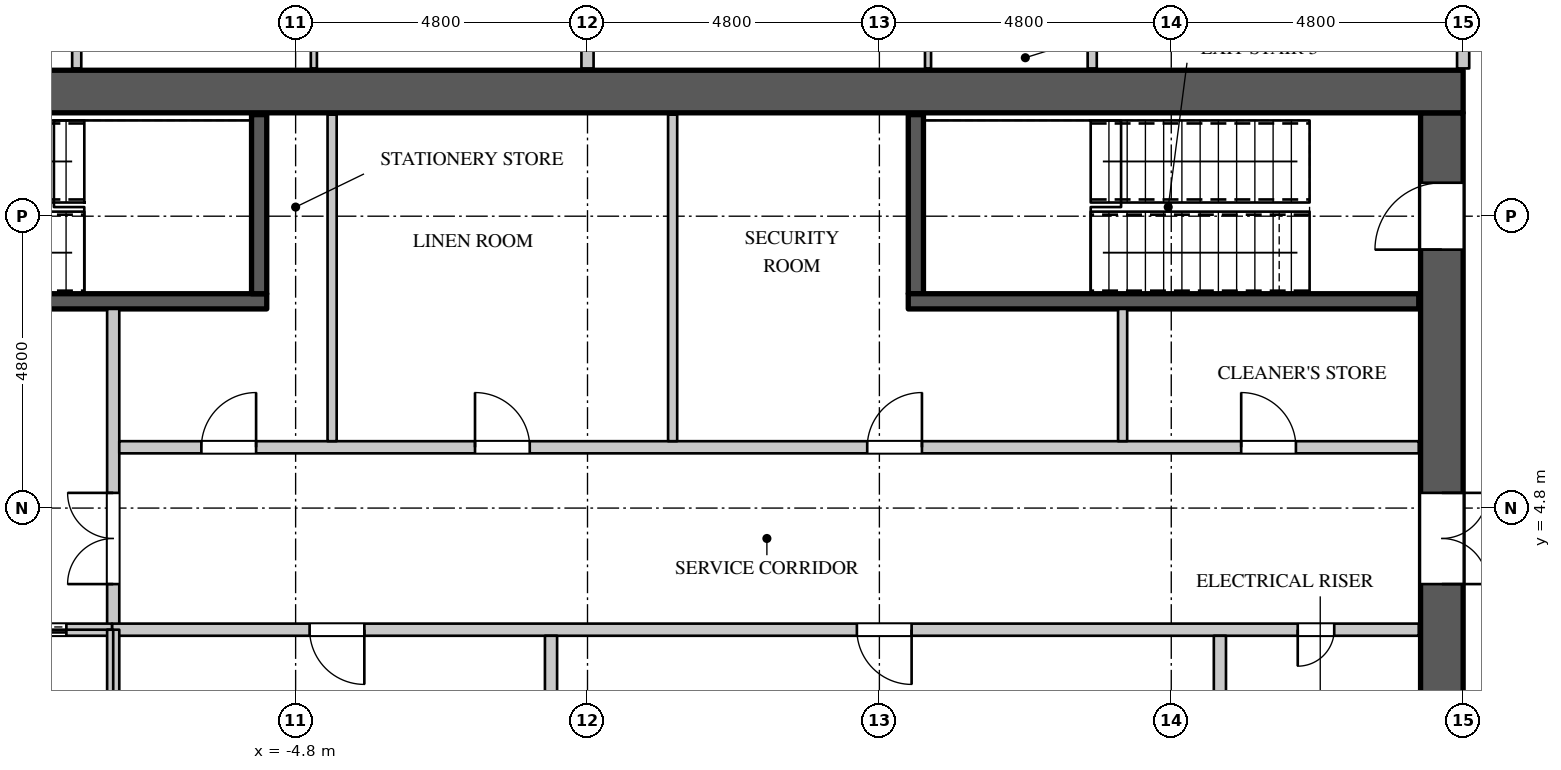
"""IFC4 building model, lengths in metres.
Left out: names, types, materials, properties, quantities, classifications, styles, units other than length and angle.
Written with IfcOpenShell. Run it as: python <this file> out.ifc"""

import sys

from ifc_helpers import new_model, si_unit, direction, frame, frame_2d, origin, place, context, subcontext, project, spatial, rectangle, extrude, element, fill, save


model = new_model("IFC4")
c1 = context("Model", 3, precision=1e-05, world=origin(), true_north=direction((0.0, 1.0)))
c2 = subcontext(c1, "Body", "Model", "MODEL_VIEW")
j1 = project(units=[si_unit("LENGTHUNIT", "METRE"), si_unit("PLANEANGLEUNIT", "RADIAN")], contexts=[c1])
p1 = place(None, origin())
s1 = spatial("IfcSite", under=j1, at=p1, CompositionType="ELEMENT")
p2 = place(p1, origin())
s2 = spatial("IfcBuilding", under=s1, at=p2, CompositionType="ELEMENT")
p3 = place(p2, frame((0.0, 0.0, 204.3)))
s3 = spatial("IfcBuildingStorey", under=s2, at=p3, CompositionType="ELEMENT", Elevation=204.3)
p4 = place(p3, frame((-14.4, 11.65, 0.0), z_axis=(0.0, 0.0, 1.0), x_axis=(1.0, 0.0, 0.0)))
e1 = element("IfcWall", 1, at=p4, inside=s3, PredefinedType="SHEAR", context=c2, shape_type="SweptSolid", body=[
    extrude(rectangle(XDim=28.8, YDim=0.7, at=frame_2d((14.4, 0.0))), origin(), (0.0, 0.0, 1.0), 4.2),
])
p5 = place(p3, frame((14.05, -11.3, 0.0), z_axis=(0.0, 0.0, 1.0), x_axis=(0.0, 1.0, 0.0)))
e2 = element("IfcWall", 2, at=p5, inside=s3, PredefinedType="SHEAR", context=c2, shape_type="SweptSolid", body=[
    extrude(rectangle(XDim=22.6, YDim=0.7, at=frame_2d((11.3, 0.0))), origin(), (0.0, 0.0, 1.0), 4.2),
])
p6 = place(p5, frame((20.35, 0.0, 0.0)))
e3 = element("IfcOpeningElement", 3, at=p6, cuts=e2, PredefinedType="OPENING", context=c2, shape_type="SweptSolid", body=[
    extrude(rectangle(XDim=1.1, YDim=2.2, at=frame_2d((0.55, 1.1))), frame((0.0, 0.36, 0.0), z_axis=(0.0, -1.0, 0.0), x_axis=(1.0, 0.0, 0.0)), (0.0, 0.0, 1.0), 0.72),
])
p7 = place(p5, frame((1.15, 0.0, 0.0)))
e4 = element("IfcOpeningElement", 4, at=p7, cuts=e2, PredefinedType="OPENING", context=c2, shape_type="SweptSolid", body=[
    extrude(rectangle(XDim=1.1, YDim=2.2, at=frame_2d((0.55, 1.1))), frame((0.0, 0.36, 0.0), z_axis=(0.0, -1.0, 0.0), x_axis=(1.0, 0.0, 0.0)), (0.0, 0.0, 1.0), 0.72),
])
p8 = place(p5, frame((14.85, 0.0, 0.0)))
e5 = element("IfcOpeningElement", 5, at=p8, cuts=e2, PredefinedType="OPENING", context=c2, shape_type="SweptSolid", body=[
    extrude(rectangle(XDim=1.5, YDim=2.4, at=frame_2d((0.75, 1.2))), frame((0.0, 0.36, 0.0), z_axis=(0.0, -1.0, 0.0), x_axis=(1.0, 0.0, 0.0)), (0.0, 0.0, 1.0), 0.72),
])
p9 = place(p5, frame((6.25, 0.0, 0.0)))
e6 = element("IfcOpeningElement", 6, at=p9, cuts=e2, PredefinedType="OPENING", context=c2, shape_type="SweptSolid", body=[
    extrude(rectangle(XDim=1.5, YDim=2.4, at=frame_2d((0.75, 1.2))), frame((0.0, 0.36, 0.0), z_axis=(0.0, -1.0, 0.0), x_axis=(1.0, 0.0, 0.0)), (0.0, 0.0, 1.0), 0.72),
])
p10 = place(p3, frame((-7.8, 2.8, 0.0), z_axis=(0.0, 0.0, 1.0), x_axis=(0.0, 1.0, 0.0)))
e7 = element("IfcWall", 7, at=p10, inside=s3, PredefinedType="PARTITIONING", context=c2, shape_type="SweptSolid", body=[
    extrude(rectangle(XDim=5.275, YDim=0.2, at=frame_2d((2.637, 0.0))), origin(), (0.0, 0.0, 1.0), 3.798),
])
p11 = place(p10, frame((0.75, 0.0, 0.0)))
e8 = element("IfcOpeningElement", 8, at=p11, cuts=e7, PredefinedType="OPENING", context=c2, shape_type="SweptSolid", body=[
    extrude(rectangle(XDim=1.5, YDim=2.4, at=frame_2d((0.75, 1.2))), frame((0.0, 0.11, 0.0), z_axis=(0.0, -1.0, 0.0), x_axis=(1.0, 0.0, 0.0)), (0.0, 0.0, 1.0), 0.22),
])
p12 = place(p3, frame((-7.7, 5.8, 0.0), z_axis=(0.0, 0.0, 1.0), x_axis=(1.0, 0.0, 0.0)))
e9 = element("IfcWall", 9, at=p12, inside=s3, PredefinedType="PARTITIONING", context=c2, shape_type="SweptSolid", body=[
    extrude(rectangle(XDim=21.37, YDim=0.2, at=frame_2d((10.685, 0.0))), origin(), (0.0, 0.0, 1.0), 3.798),
])
p13 = place(p12, frame((1.35, 0.0, 0.0)))
e10 = element("IfcOpeningElement", 10, at=p13, cuts=e9, PredefinedType="OPENING", context=c2, shape_type="SweptSolid", body=[
    extrude(rectangle(XDim=0.9, YDim=2.2, at=frame_2d((0.45, 1.1))), frame((0.0, 0.11, 0.0), z_axis=(0.0, -1.0, 0.0), x_axis=(1.0, 0.0, 0.0)), (0.0, 0.0, 1.0), 0.22),
])
p14 = place(p12, frame((5.85, 0.0, 0.0)))
e11 = element("IfcOpeningElement", 11, at=p14, cuts=e9, PredefinedType="OPENING", context=c2, shape_type="SweptSolid", body=[
    extrude(rectangle(XDim=0.9, YDim=2.2, at=frame_2d((0.45, 1.1))), frame((0.0, 0.11, 0.0), z_axis=(0.0, -1.0, 0.0), x_axis=(1.0, 0.0, 0.0)), (0.0, 0.0, 1.0), 0.22),
])
p15 = place(p12, frame((12.3, 0.0, 0.0)))
e12 = element("IfcOpeningElement", 12, at=p15, cuts=e9, PredefinedType="OPENING", context=c2, shape_type="SweptSolid", body=[
    extrude(rectangle(XDim=0.9, YDim=2.2, at=frame_2d((0.45, 1.1))), frame((0.0, 0.11, 0.0), z_axis=(0.0, -1.0, 0.0), x_axis=(1.0, 0.0, 0.0)), (0.0, 0.0, 1.0), 0.22),
])
p16 = place(p12, frame((18.45, 0.0, 0.0)))
e13 = element("IfcOpeningElement", 13, at=p16, cuts=e9, PredefinedType="OPENING", context=c2, shape_type="SweptSolid", body=[
    extrude(rectangle(XDim=0.9, YDim=2.2, at=frame_2d((0.45, 1.1))), frame((0.0, 0.11, 0.0), z_axis=(0.0, -1.0, 0.0), x_axis=(1.0, 0.0, 0.0)), (0.0, 0.0, 1.0), 0.22),
])
p17 = place(p3, frame((14.4, 12.03, 0.0), z_axis=(0.0, 0.0, 1.0), x_axis=(0.0, 1.0, 0.0)))
e14 = element("IfcWall", 14, at=p17, inside=s3, PredefinedType="PARTITIONING", context=c2, shape_type="SweptSolid", body=[
    extrude(rectangle(XDim=2.27, YDim=0.2, at=frame_2d((1.135, 0.0))), origin(), (0.0, 0.0, 1.0), 3.798),
])
p18 = place(p17, frame((0.55, 0.0, 0.0)))
e15 = element("IfcOpeningElement", 15, at=p18, cuts=e14, PredefinedType="OPENING", context=c2, shape_type="SweptSolid", body=[
    extrude(rectangle(XDim=1.1, YDim=2.4, at=frame_2d((0.55, 1.2))), frame((0.0, 0.11, 0.0), z_axis=(0.0, -1.0, 0.0), x_axis=(1.0, 0.0, 0.0)), (0.0, 0.0, 1.0), 0.22),
])
p19 = place(p3, frame((-8.4, 12.03, 0.0), z_axis=(0.0, 0.0, 1.0), x_axis=(0.0, 1.0, 0.0)))
e16 = element("IfcWall", 16, at=p19, inside=s3, PredefinedType="PARTITIONING", context=c2, shape_type="SweptSolid", body=[
    extrude(rectangle(XDim=4.245, YDim=0.15, at=frame_2d((2.123, 0.0))), origin(), (0.0, 0.0, 1.0), 3.798),
])
for number, where, z_axis, x_axis in (
    (17, (-4.2, 5.9, 0.0), (0.0, 0.0, 1.0), (0.0, 1.0, 0.0)),
    (18, (1.4, 5.9, 0.0), (0.0, 0.0, 1.0), (0.0, 1.0, 0.0)),
):
    element("IfcWall", number, at=place(p3, frame(where, z_axis=z_axis, x_axis=x_axis)), inside=s3, PredefinedType="PARTITIONING", context=c2, shape_type="SweptSolid", body=[
        extrude(rectangle(XDim=5.37, YDim=0.15, at=frame_2d((2.685, 0.0))), origin(), (0.0, 0.0, 1.0), 3.798),
    ])
p20 = place(p3, frame((8.3, 12.03, 0.0), z_axis=(0.0, 0.0, 1.0), x_axis=(0.0, 1.0, 0.0)))
e19 = element("IfcWall", 19, at=p20, inside=s3, PredefinedType="PARTITIONING", context=c2, shape_type="SweptSolid", body=[
    extrude(rectangle(XDim=3.445, YDim=0.15, at=frame_2d((1.723, 0.0))), origin(), (0.0, 0.0, 1.0), 3.798),
])
p21 = place(p20, frame((1.2, 0.0, 0.0)))
e20 = element("IfcOpeningElement", 20, at=p21, cuts=e19, PredefinedType="OPENING", context=c2, shape_type="SweptSolid", body=[
    extrude(rectangle(XDim=0.95, YDim=2.2, at=frame_2d((0.475, 1.1))), frame((0.0, 0.085, 0.0), z_axis=(0.0, -1.0, 0.0), x_axis=(1.0, 0.0, 0.0)), (0.0, 0.0, 1.0), 0.17),
])
p22 = place(p3, frame((8.8, 5.9, 0.0), z_axis=(0.0, 0.0, 1.0), x_axis=(0.0, 1.0, 0.0)))
e21 = element("IfcWall", 21, at=p22, inside=s3, PredefinedType="PARTITIONING", context=c2, shape_type="SweptSolid", body=[
    extrude(rectangle(XDim=2.175, YDim=0.15, at=frame_2d((1.087, 0.0))), origin(), (0.0, 0.0, 1.0), 3.798),
])
p23 = place(p3, frame((0.0, 12.03, 0.0), z_axis=(0.0, 0.0, 1.0), x_axis=(0.0, 1.0, 0.0)))
e22 = element("IfcWall", 22, at=p23, inside=s3, PredefinedType="PARTITIONING", context=c2, shape_type="SweptSolid", body=[
    extrude(rectangle(XDim=11.995, YDim=0.2, at=frame_2d((5.998, 0.0))), origin(), (0.0, 0.0, 1.0), 3.798),
])
p24 = place(p3, frame((-7.82, 2.8, 0.0), z_axis=(0.0, 0.0, 1.0), x_axis=(1.0, 0.0, 0.0)))
e23 = element("IfcWall", 23, at=p24, inside=s3, PredefinedType="PARTITIONING", context=c2, shape_type="SweptSolid", body=[
    extrude(rectangle(XDim=21.49, YDim=0.2, at=frame_2d((10.745, 0.0))), origin(), (0.0, 0.0, 1.0), 3.798),
])
p25 = place(p24, frame((19.5, 0.0, 0.0)))
e24 = element("IfcOpeningElement", 24, at=p25, cuts=e23, PredefinedType="OPENING", context=c2, shape_type="SweptSolid", body=[
    extrude(rectangle(XDim=0.6, YDim=2.0, at=frame_2d((0.3, 1.0))), frame((0.0, 0.11, 0.0), z_axis=(0.0, -1.0, 0.0), x_axis=(1.0, 0.0, 0.0)), (0.0, 0.0, 1.0), 0.22),
])
p26 = place(p24, frame((3.25, 0.0, 0.0)))
e25 = element("IfcOpeningElement", 25, at=p26, cuts=e23, PredefinedType="OPENING", context=c2, shape_type="SweptSolid", body=[
    extrude(rectangle(XDim=0.9, YDim=2.2, at=frame_2d((0.45, 1.1))), frame((0.0, 0.11, 0.0), z_axis=(0.0, -1.0, 0.0), x_axis=(1.0, 0.0, 0.0)), (0.0, 0.0, 1.0), 0.22),
])
p27 = place(p24, frame((12.25, 0.0, 0.0)))
e26 = element("IfcOpeningElement", 26, at=p27, cuts=e23, PredefinedType="OPENING", context=c2, shape_type="SweptSolid", body=[
    extrude(rectangle(XDim=0.9, YDim=2.2, at=frame_2d((0.45, 1.1))), frame((0.0, 0.11, 0.0), z_axis=(0.0, -1.0, 0.0), x_axis=(1.0, 0.0, 0.0)), (0.0, 0.0, 1.0), 0.22),
])
for number, where, z_axis, x_axis in (
    (27, (-0.6, 0.1, 0.0), (0.0, 0.0, 1.0), (0.0, 1.0, 0.0)),
    (28, (10.4, 0.1, 0.0), (0.0, 0.0, 1.0), (0.0, 1.0, 0.0)),
):
    element("IfcWall", number, at=place(p3, frame(where, z_axis=z_axis, x_axis=x_axis)), inside=s3, PredefinedType="PARTITIONING", context=c2, shape_type="SweptSolid", body=[
        extrude(rectangle(XDim=2.6, YDim=0.2, at=frame_2d((1.3, 0.0))), origin(), (0.0, 0.0, 1.0), 3.798),
    ])
p28 = place(p3, frame((-13.67, 2.8, 0.0), z_axis=(0.0, 0.0, 1.0), x_axis=(1.0, 0.0, 0.0)))
e29 = element("IfcWall", 29, at=p28, inside=s3, PredefinedType="PARTITIONING", context=c2, shape_type="SweptSolid", body=[
    extrude(rectangle(XDim=5.85, YDim=0.2, at=frame_2d((2.925, 0.0))), origin(), (0.0, 0.0, 1.0), 3.798),
])
p29 = place(p28, frame((1.05, 0.0, 0.0)))
e30 = element("IfcOpeningElement", 30, at=p29, cuts=e29, PredefinedType="OPENING", context=c2, shape_type="SweptSolid", body=[
    extrude(rectangle(XDim=1.1, YDim=2.2, at=frame_2d((0.55, 1.1))), frame((0.0, 0.11, 0.0), z_axis=(0.0, -1.0, 0.0), x_axis=(1.0, 0.0, 0.0)), (0.0, 0.0, 1.0), 0.22),
])
p30 = place(p28, frame((4.0, 0.0, 0.0)))
e31 = element("IfcOpeningElement", 31, at=p30, cuts=e29, PredefinedType="OPENING", context=c2, shape_type="SweptSolid", body=[
    extrude(rectangle(XDim=1.1, YDim=2.2, at=frame_2d((0.55, 1.1))), frame((0.0, 0.11, 0.0), z_axis=(0.0, -1.0, 0.0), x_axis=(1.0, 0.0, 0.0)), (0.0, 0.0, 1.0), 0.22),
])
p31 = place(p3, frame((-7.8, 0.0, 0.0), z_axis=(0.0, 0.0, 1.0), x_axis=(0.0, 1.0, 0.0)))
e32 = element("IfcWall", 32, at=p31, inside=s3, PredefinedType="PARTITIONING", context=c2, shape_type="SweptSolid", body=[
    extrude(rectangle(XDim=2.8, YDim=0.2, at=frame_2d((1.4, 0.0))), origin(), (0.0, 0.0, 1.0), 3.798),
])
p32 = place(p3, frame((-13.67, 8.2, 0.0), z_axis=(0.0, 0.0, 1.0), x_axis=(1.0, 0.0, 0.0)))
e33 = element("IfcWall", 33, at=p32, inside=s3, PredefinedType="SHEAR", context=c2, shape_type="SweptSolid", body=[
    extrude(rectangle(XDim=8.395, YDim=0.25, at=frame_2d((4.198, 0.0))), origin(), (0.0, 0.0, 1.0), 3.798),
])
p33 = place(p32, frame((0.15, 0.0, 0.0)))
e34 = element("IfcOpeningElement", 34, at=p33, cuts=e33, PredefinedType="OPENING", context=c2, shape_type="SweptSolid", body=[
    extrude(rectangle(XDim=1.1, YDim=2.2, at=frame_2d((0.55, 1.1))), frame((0.0, 0.135, 0.0), z_axis=(0.0, -1.0, 0.0), x_axis=(1.0, 0.0, 0.0)), (0.0, 0.0, 1.0), 0.27),
])
for number, where, z_axis, x_axis in (
    (35, (-5.4, 8.325, 0.0), (0.0, 0.0, 1.0), (0.0, 1.0, 0.0)),
    (36, (5.4, 8.325, 0.0), (0.0, 0.0, 1.0), (0.0, 1.0, 0.0)),
):
    element("IfcWall", number, at=place(p3, frame(where, z_axis=z_axis, x_axis=x_axis)), inside=s3, PredefinedType="SHEAR", context=c2, shape_type="SweptSolid", body=[
        extrude(rectangle(XDim=2.945, YDim=0.25, at=frame_2d((1.473, 0.0))), origin(), (0.0, 0.0, 1.0), 3.798),
    ])
p34 = place(p3, frame((5.275, 8.2, 0.0), z_axis=(0.0, 0.0, 1.0), x_axis=(1.0, 0.0, 0.0)))
e37 = element("IfcWall", 37, at=p34, inside=s3, PredefinedType="SHEAR", context=c2, shape_type="SweptSolid", body=[
    extrude(rectangle(XDim=8.395, YDim=0.25, at=frame_2d((4.198, 0.0))), origin(), (0.0, 0.0, 1.0), 3.798),
])
p35 = place(p3, frame((-4.5, 12.03, 0.0), z_axis=(0.0, 0.0, 1.0), x_axis=(0.0, 1.0, 0.0)))
e38 = element("IfcWall", 38, at=p35, inside=s3, PredefinedType="PARTITIONING", context=c2, shape_type="SweptSolid", body=[
    extrude(rectangle(XDim=4.695, YDim=0.1, at=frame_2d((2.348, 0.0))), origin(), (0.0, 0.0, 1.0), 3.798),
])
p36 = place(p3, frame((5.6, 12.03, 0.0), z_axis=(0.0, 0.0, 1.0), x_axis=(0.0, 1.0, 0.0)))
e39 = element("IfcWall", 39, at=p36, inside=s3, PredefinedType="PARTITIONING", context=c2, shape_type="SweptSolid", body=[
    extrude(rectangle(XDim=4.395, YDim=0.1, at=frame_2d((2.198, 0.0))), origin(), (0.0, 0.0, 1.0), 3.798),
])
p37 = place(p25, origin())
e40 = element("IfcDoor", 40, at=p37, inside=s3, OperationType="SINGLE_SWING_RIGHT", PredefinedType="DOOR", context=c2, shape_type="SweptSolid", body=[
    extrude(rectangle(XDim=0.6, YDim=2.0, at=frame_2d((0.3, 1.0))), frame((0.0, 0.025, 0.0), z_axis=(0.0, -1.0, 0.0), x_axis=(1.0, 0.0, 0.0)), (0.0, 0.0, 1.0), 0.05),
])
fill(e24, e40)
p38 = place(p13, origin())
e41 = element("IfcDoor", 41, at=p38, inside=s3, OperationType="SINGLE_SWING_RIGHT", PredefinedType="DOOR", context=c2, shape_type="SweptSolid", body=[
    extrude(rectangle(XDim=0.9, YDim=2.2, at=frame_2d((0.45, 1.1))), frame((0.0, 0.025, 0.0), z_axis=(0.0, -1.0, 0.0), x_axis=(1.0, 0.0, 0.0)), (0.0, 0.0, 1.0), 0.05),
])
fill(e10, e41)
p39 = place(p14, origin())
e42 = element("IfcDoor", 42, at=p39, inside=s3, OperationType="SINGLE_SWING_LEFT", PredefinedType="DOOR", context=c2, shape_type="SweptSolid", body=[
    extrude(rectangle(XDim=0.9, YDim=2.2, at=frame_2d((0.45, 1.1))), frame((0.0, 0.025, 0.0), z_axis=(0.0, -1.0, 0.0), x_axis=(1.0, 0.0, 0.0)), (0.0, 0.0, 1.0), 0.05),
])
fill(e11, e42)
p40 = place(p15, origin())
e43 = element("IfcDoor", 43, at=p40, inside=s3, OperationType="SINGLE_SWING_RIGHT", PredefinedType="DOOR", context=c2, shape_type="SweptSolid", body=[
    extrude(rectangle(XDim=0.9, YDim=2.2, at=frame_2d((0.45, 1.1))), frame((0.0, 0.025, 0.0), z_axis=(0.0, -1.0, 0.0), x_axis=(1.0, 0.0, 0.0)), (0.0, 0.0, 1.0), 0.05),
])
fill(e12, e43)
p41 = place(p16, origin())
e44 = element("IfcDoor", 44, at=p41, inside=s3, OperationType="SINGLE_SWING_LEFT", PredefinedType="DOOR", context=c2, shape_type="SweptSolid", body=[
    extrude(rectangle(XDim=0.9, YDim=2.2, at=frame_2d((0.45, 1.1))), frame((0.0, 0.025, 0.0), z_axis=(0.0, -1.0, 0.0), x_axis=(1.0, 0.0, 0.0)), (0.0, 0.0, 1.0), 0.05),
])
fill(e13, e44)
p42 = place(p26, origin())
e45 = element("IfcDoor", 45, at=p42, inside=s3, OperationType="SINGLE_SWING_LEFT", PredefinedType="DOOR", context=c2, shape_type="SweptSolid", body=[
    extrude(rectangle(XDim=0.9, YDim=2.2, at=frame_2d((0.45, 1.1))), frame((0.0, 0.025, 0.0), z_axis=(0.0, -1.0, 0.0), x_axis=(1.0, 0.0, 0.0)), (0.0, 0.0, 1.0), 0.05),
])
fill(e25, e45)
p43 = place(p27, origin())
e46 = element("IfcDoor", 46, at=p43, inside=s3, OperationType="SINGLE_SWING_LEFT", PredefinedType="DOOR", context=c2, shape_type="SweptSolid", body=[
    extrude(rectangle(XDim=0.9, YDim=2.2, at=frame_2d((0.45, 1.1))), frame((0.0, 0.025, 0.0), z_axis=(0.0, -1.0, 0.0), x_axis=(1.0, 0.0, 0.0)), (0.0, 0.0, 1.0), 0.05),
])
fill(e26, e46)
p44 = place(p30, origin())
e47 = element("IfcDoor", 47, at=p44, inside=s3, OperationType="DOUBLE_DOOR_SLIDING", PredefinedType="DOOR", context=c2, shape_type="SweptSolid", body=[
    extrude(rectangle(XDim=1.1, YDim=2.2, at=frame_2d((0.55, 1.1))), frame((0.0, 0.025, 0.0), z_axis=(0.0, -1.0, 0.0), x_axis=(1.0, 0.0, 0.0)), (0.0, 0.0, 1.0), 0.05),
])
fill(e31, e47)
p45 = place(p11, origin())
e48 = element("IfcDoor", 48, at=p45, inside=s3, OperationType="DOUBLE_DOOR_SINGLE_SWING", PredefinedType="DOOR", context=c2, shape_type="SweptSolid", body=[
    extrude(rectangle(XDim=1.5, YDim=2.4, at=frame_2d((0.75, 1.2))), frame((0.0, 0.025, 0.0), z_axis=(0.0, -1.0, 0.0), x_axis=(1.0, 0.0, 0.0)), (0.0, 0.0, 1.0), 0.05),
])
fill(e8, e48)
p46 = place(p6, origin())
e49 = element("IfcDoor", 49, at=p46, inside=s3, OperationType="SINGLE_SWING_LEFT", PredefinedType="DOOR", context=c2, shape_type="SweptSolid", body=[
    extrude(rectangle(XDim=1.1, YDim=2.2, at=frame_2d((0.55, 1.1))), frame((0.0, 0.345, 0.0), z_axis=(0.0, -1.0, 0.0), x_axis=(1.0, 0.0, 0.0)), (0.0, 0.0, 1.0), 0.05),
])
fill(e3, e49)
p47 = place(p8, origin())
e50 = element("IfcDoor", 50, at=p47, inside=s3, OperationType="DOUBLE_DOOR_SINGLE_SWING", PredefinedType="DOOR", context=c2, shape_type="SweptSolid", body=[
    extrude(rectangle(XDim=1.5, YDim=2.4, at=frame_2d((0.75, 1.2))), frame((0.0, -0.295, 0.0), z_axis=(0.0, -1.0, 0.0), x_axis=(1.0, 0.0, 0.0)), (0.0, 0.0, 1.0), 0.05),
])
fill(e5, e50)
save(model, sys.argv[1])
